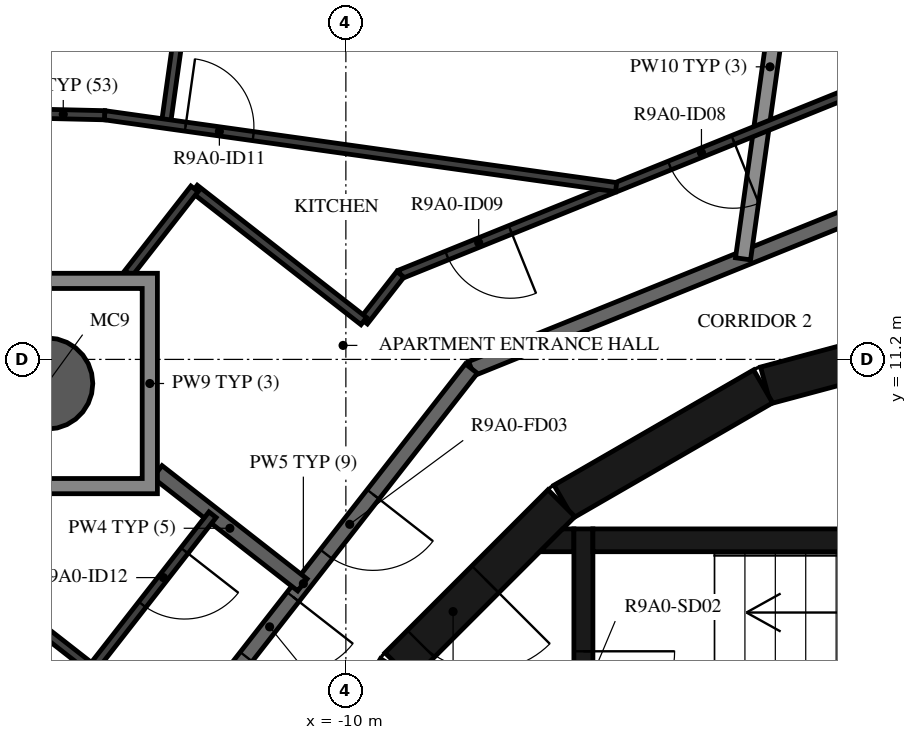
"""IFC4 building model, lengths in metres.
Left out: names, types, materials, properties, quantities, classifications, styles, units other than length and angle.
Written with IfcOpenShell. Run it as: python <this file> out.ifc"""

import sys

from ifc_helpers import new_model, si_unit, direction, frame, frame_2d, origin, origin_2d, place, context, subcontext, project, spatial, polyline, rectangle, hollow_circle, outline, extrude, element, fill, save


model = new_model("IFC4")
c1 = context("Model", 3, precision=1e-05, world=origin(), true_north=direction((0.0, 1.0)))
c2 = subcontext(c1, "Body", "Model", "MODEL_VIEW")
j1 = project(units=[si_unit("LENGTHUNIT", "METRE"), si_unit("PLANEANGLEUNIT", "RADIAN")], contexts=[c1])
p1 = place(None, origin())
s1 = spatial("IfcSite", under=j1, at=p1, CompositionType="ELEMENT")
p2 = place(p1, origin())
s2 = spatial("IfcBuilding", under=s1, at=p2, CompositionType="ELEMENT")
p3 = place(p2, frame((0.0, 0.0, 340.0)))
s3 = spatial("IfcBuildingStorey", under=s2, at=p3, CompositionType="ELEMENT", Elevation=340.0)
p4 = place(p3, frame((-13.929, 10.883, -0.38), z_axis=(0.0, 0.0, 1.0), x_axis=(1.0, 0.0, 0.0)))
e1 = element("IfcColumn", 1, at=p4, inside=s3, PredefinedType="COLUMN", context=c2, shape_type="SweptSolid", body=[
    extrude(hollow_circle(Radius=0.6, WallThickness=0.03, at=origin_2d()), origin(), (0.0, 0.0, 1.0), 3.5),
])
for number, where, z_axis, x_axis in (
    (2, (-1.55, 11.643, 0.0), (0.0, 0.0, 1.0), (-0.966, -0.259, 0.0)),
    (3, (-4.51, 10.845, 0.0), (0.0, 0.0, 1.0), (-0.866, -0.5, 0.0)),
):
    element("IfcWall", number, at=place(p3, frame(where, z_axis=z_axis, x_axis=x_axis)), inside=s3, PredefinedType="SHEAR", context=c2, shape_type="SweptSolid", body=[
        extrude(rectangle(XDim=3.033, YDim=0.5, at=frame_2d((1.516, 0.0))), origin(), (0.0, 0.0, 1.0), 3.12),
    ])
p5 = place(p3, frame((-7.164, 9.308, 0.0), z_axis=(0.0, 0.0, 1.0), x_axis=(-0.707106781187, -0.707106781187, 0.0)))
e4 = element("IfcWall", 4, at=p5, inside=s3, PredefinedType="SHEAR", context=c2, shape_type="SweptSolid", body=[
    extrude(rectangle(XDim=3.032, YDim=0.5, at=frame_2d((1.516, 0.0))), origin(), (0.0, 0.0, 1.0), 3.12),
])
p6 = place(p5, frame((1.416, 0.0, 0.0)))
e5 = element("IfcOpeningElement", 5, at=p6, cuts=e4, PredefinedType="OPENING", context=c2, shape_type="SweptSolid", body=[
    extrude(rectangle(XDim=1.2, YDim=2.1, at=frame_2d((0.6, 1.05))), frame((0.0, 0.26, 0.0), z_axis=(0.0, -1.0, 0.0), x_axis=(1.0, 0.0, 0.0)), (0.0, 0.0, 1.0), 0.52),
])
p7 = place(p3, frame((-9.329, 7.137, 0.0), z_axis=(0.0, 0.0, 1.0), x_axis=(-0.500087131594, -0.865975092491, 0.0)))
e6 = element("IfcWall", 6, at=p7, inside=s3, PredefinedType="SHEAR", context=c2, shape_type="SweptSolid", body=[
    extrude(rectangle(XDim=3.033, YDim=0.5, at=frame_2d((1.516, 0.0))), origin(), (0.0, 0.0, 1.0), 3.12),
])
p8 = place(p3, frame((-6.75, 8.82, 0.0), z_axis=(0.0, 0.0, 1.0), x_axis=(1.0, 0.0, 0.0)))
e7 = element("IfcWall", 7, at=p8, inside=s3, PredefinedType="SHEAR", context=c2, shape_type="SweptSolid", body=[
    extrude(rectangle(XDim=6.75, YDim=0.3, at=frame_2d((3.375, 0.0))), origin(), (0.0, 0.0, 1.0), 3.12),
])
p9 = place(p3, frame((-6.875, 8.97, 0.0), z_axis=(0.0, 0.0, 1.0), x_axis=(0.0, -1.0, 0.0)))
e8 = element("IfcWall", 8, at=p9, inside=s3, PredefinedType="SHEAR", context=c2, shape_type="SweptSolid", body=[
    extrude(rectangle(XDim=3.92, YDim=0.25, at=frame_2d((1.96, 0.0))), origin(), (0.0, 0.0, 1.0), 3.12),
])
p10 = place(p9, frame((1.61, 0.0, 0.0)))
e9 = element("IfcOpeningElement", 9, at=p10, cuts=e8, PredefinedType="OPENING", context=c2, shape_type="SweptSolid", body=[
    extrude(rectangle(XDim=1.2, YDim=2.1, at=frame_2d((0.6, 1.05))), frame((0.0, 0.135, 0.0), z_axis=(0.0, -1.0, 0.0), x_axis=(1.0, 0.0, 0.0)), (0.0, 0.0, 1.0), 0.27),
])
p11 = place(p3, origin())
e10 = element("IfcWall", 10, at=p11, inside=s3, PredefinedType="SHEAR", context=c2, shape_type="SweptSolid", body=[
    extrude(outline(polyline([(-7.148, 8.97), (-7.0, 8.97), (-7.0, 8.67), (-7.448, 8.67), (-7.148, 8.97)])), origin(), (0.0, 0.0, 1.0), 3.12),
])
p12 = place(p3, frame((-1.691, 13.769, 0.0), z_axis=(0.0, 0.0, 1.0), x_axis=(-0.92717916932, -0.374618189599, 0.0)))
e11 = element("IfcWall", 11, at=p12, inside=s3, PredefinedType="STANDARD", context=c2, shape_type="SweptSolid", body=[
    extrude(rectangle(XDim=7.181, YDim=0.2, at=frame_2d((3.591, 0.0))), origin(), (0.0, 0.0, 1.0), 3.12),
])
p13 = place(p3, frame((-8.349, 11.079, 0.0), z_axis=(0.0, 0.0, 1.0), x_axis=(-0.615669112324, -0.78800478687, 0.0)))
e12 = element("IfcWall", 12, at=p13, inside=s3, PredefinedType="STANDARD", context=c2, shape_type="SweptSolid", body=[
    extrude(rectangle(XDim=7.181, YDim=0.2, at=frame_2d((3.591, 0.0))), origin(), (0.0, 0.0, 1.0), 3.12),
])
p14 = place(p13, frame((2.1, 0.0, 0.0)))
e13 = element("IfcOpeningElement", 13, at=p14, cuts=e12, PredefinedType="OPENING", context=c2, shape_type="SweptSolid", body=[
    extrude(rectangle(XDim=1.0, YDim=2.1, at=frame_2d((0.5, 1.05))), frame((0.0, 0.11, 0.0), z_axis=(0.0, -1.0, 0.0), x_axis=(1.0, 0.0, 0.0)), (0.0, 0.0, 1.0), 0.22),
])
p15 = place(p13, frame((3.811, 0.0, 0.0)))
e14 = element("IfcOpeningElement", 14, at=p15, cuts=e12, PredefinedType="OPENING", context=c2, shape_type="SweptSolid", body=[
    extrude(rectangle(XDim=1.0, YDim=2.1, at=frame_2d((0.5, 1.05))), frame((0.0, 0.11, 0.0), z_axis=(0.0, -1.0, 0.0), x_axis=(1.0, 0.0, 0.0)), (0.0, 0.0, 1.0), 0.22),
])
p16 = place(p3, frame((-4.065, 17.575, 0.0), z_axis=(0.0, 0.0, 1.0), x_axis=(-0.139163175955, -0.990269463559, 0.0)))
e15 = element("IfcWall", 15, at=p16, inside=s3, PredefinedType="STANDARD", context=c2, shape_type="SweptSolid", body=[
    extrude(rectangle(XDim=5.102, YDim=0.2, at=frame_2d((2.551, 0.0))), origin(), (0.0, 0.0, 1.0), 2.73),
])
p17 = place(p3, frame((-12.479, 9.723, 0.0), z_axis=(0.0, 0.0, 1.0), x_axis=(0.788030490991, -0.615636211792, 0.0)))
e16 = element("IfcWall", 16, at=p17, inside=s3, PredefinedType="STANDARD", context=c2, shape_type="SweptSolid", body=[
    extrude(rectangle(XDim=2.42, YDim=0.2, at=frame_2d((1.21, 0.0))), origin(), (0.0, 0.0, 1.0), 3.12),
])
p18 = place(p3, frame((-1.88, 15.311, 0.0), z_axis=(0.0, 0.0, 1.0), x_axis=(-0.927184866592, -0.374604088557, 0.0)))
e17 = element("IfcWall", 17, at=p18, inside=s3, PredefinedType="PARTITIONING", context=c2, shape_type="SweptSolid", body=[
    extrude(rectangle(XDim=7.985, YDim=0.12, at=frame_2d((3.993, 0.0))), origin(), (0.0, 0.0, 1.0), 3.12),
])
p19 = place(p18, frame((3.262, 0.0, 0.0)))
e18 = element("IfcOpeningElement", 18, at=p19, cuts=e17, PredefinedType="OPENING", context=c2, shape_type="SweptSolid", body=[
    extrude(rectangle(XDim=0.9, YDim=2.1, at=frame_2d((0.45, 1.05))), frame((0.0, 0.07, 0.0), z_axis=(0.0, -1.0, 0.0), x_axis=(1.0, 0.0, 0.0)), (0.0, 0.0, 1.0), 0.14),
])
p20 = place(p18, frame((6.423, 0.0, 0.0)))
e19 = element("IfcOpeningElement", 19, at=p20, cuts=e17, PredefinedType="OPENING", context=c2, shape_type="SweptSolid", body=[
    extrude(rectangle(XDim=0.9, YDim=2.1, at=frame_2d((0.45, 1.05))), frame((0.0, 0.07, 0.0), z_axis=(0.0, -1.0, 0.0), x_axis=(1.0, 0.0, 0.0)), (0.0, 0.0, 1.0), 0.14),
])
p21 = place(p3, frame((-9.283, 12.319, 0.0), z_axis=(0.0, 0.0, 1.0), x_axis=(-0.615735018346, -0.787953289975, 0.0)))
e20 = element("IfcWall", 20, at=p21, inside=s3, PredefinedType="PARTITIONING", context=c2, shape_type="SweptSolid", body=[
    extrude(rectangle(XDim=0.781, YDim=0.12, at=frame_2d((0.391, 0.0))), origin(), (0.0, 0.0, 1.0), 3.12),
])
p22 = place(p3, frame((-9.764, 11.704, 0.0), z_axis=(0.0, 0.0, 1.0), x_axis=(-0.787996873396, 0.615679240772, 0.0)))
e21 = element("IfcWall", 21, at=p22, inside=s3, PredefinedType="PARTITIONING", context=c2, shape_type="SweptSolid", body=[
    extrude(rectangle(XDim=2.826, YDim=0.12, at=frame_2d((1.413, 0.0))), origin(), (0.0, 0.0, 1.0), 3.12),
])
p23 = place(p3, frame((-11.992, 13.444, 0.0), z_axis=(0.0, 0.0, 1.0), x_axis=(-0.615593635541, -0.788063751153, 0.0)))
e22 = element("IfcWall", 22, at=p23, inside=s3, PredefinedType="PARTITIONING", context=c2, shape_type="SweptSolid", body=[
    extrude(rectangle(XDim=1.41, YDim=0.12, at=frame_2d((0.705, 0.0))), origin(), (0.0, 0.0, 1.0), 3.12),
])
p24 = place(p3, frame((-11.755, 18.656, 0.0), z_axis=(0.0, 0.0, 1.0), x_axis=(-0.13916046232, -0.990269844904, 0.0)))
e23 = element("IfcWall", 23, at=p24, inside=s3, PredefinedType="PARTITIONING", context=c2, shape_type="SweptSolid", body=[
    extrude(rectangle(XDim=4.4, YDim=0.12, at=frame_2d((2.2, 0.0))), origin(), (0.0, 0.0, 1.0), 2.73),
])
p25 = place(p24, frame((0.2, 0.0, 0.0)))
e24 = element("IfcOpeningElement", 24, at=p25, cuts=e23, PredefinedType="OPENING", context=c2, shape_type="SweptSolid", body=[
    extrude(rectangle(XDim=0.9, YDim=2.1, at=frame_2d((0.45, 1.05))), frame((0.0, 0.07, 0.0), z_axis=(0.0, -1.0, 0.0), x_axis=(1.0, 0.0, 0.0)), (0.0, 0.0, 1.0), 0.14),
])
p26 = place(p3, frame((-13.175, 14.412, 0.0), z_axis=(0.0, 0.0, 1.0), x_axis=(0.990264549393, -0.139198140128, 0.0)))
e25 = element("IfcWall", 25, at=p26, inside=s3, PredefinedType="PARTITIONING", context=c2, shape_type="SweptSolid", body=[
    extrude(rectangle(XDim=6.796, YDim=0.12, at=frame_2d((3.398, 0.0))), origin(), (0.0, 0.0, 1.0), 3.12),
])
p27 = place(p26, frame((1.075, 0.0, 0.0)))
e26 = element("IfcOpeningElement", 26, at=p27, cuts=e25, PredefinedType="OPENING", context=c2, shape_type="SweptSolid", body=[
    extrude(rectangle(XDim=0.9, YDim=2.1, at=frame_2d((0.45, 1.05))), frame((0.0, 0.07, 0.0), z_axis=(0.0, -1.0, 0.0), x_axis=(1.0, 0.0, 0.0)), (0.0, 0.0, 1.0), 0.14),
])
p28 = place(p3, frame((-14.261, 14.438, 0.0), z_axis=(0.0, 0.0, 1.0), x_axis=(0.999732237365, -0.023139869764, 0.0)))
e27 = element("IfcWall", 27, at=p28, inside=s3, PredefinedType="PARTITIONING", context=c2, shape_type="SweptSolid", body=[
    extrude(rectangle(XDim=1.087, YDim=0.12, at=frame_2d((0.543, 0.0))), origin(), (0.0, 0.0, 1.0), 3.12),
])
p29 = place(p3, frame((-11.754, 9.157, 0.0), z_axis=(0.0, 0.0, 1.0), x_axis=(-0.615568539365, -0.788083354312, 0.0)))
e28 = element("IfcWall", 28, at=p29, inside=s3, PredefinedType="PARTITIONING", context=c2, shape_type="SweptSolid", body=[
    extrude(rectangle(XDim=2.573, YDim=0.12, at=frame_2d((1.286, 0.0))), origin(), (0.0, 0.0, 1.0), 3.12),
])
p30 = place(p29, frame((0.6, 0.0, 0.0)))
e29 = element("IfcOpeningElement", 29, at=p30, cuts=e28, PredefinedType="OPENING", context=c2, shape_type="SweptSolid", body=[
    extrude(rectangle(XDim=0.9, YDim=2.1, at=frame_2d((0.45, 1.05))), frame((0.0, 0.07, 0.0), z_axis=(0.0, -1.0, 0.0), x_axis=(1.0, 0.0, 0.0)), (0.0, 0.0, 1.0), 0.14),
])
p31 = place(p3, frame((-13.338, 7.129, 0.0), z_axis=(0.0, 0.0, 1.0), x_axis=(-0.787938483233, 0.615753965997, 0.0)))
e30 = element("IfcWall", 30, at=p31, inside=s3, PredefinedType="PARTITIONING", context=c2, shape_type="SweptSolid", body=[
    extrude(rectangle(XDim=1.853, YDim=0.12, at=frame_2d((0.927, 0.0))), origin(), (0.0, 0.0, 1.0), 3.12),
])
p32 = place(p3, origin())
e31 = element("IfcWall", 31, at=p32, inside=s3, PredefinedType="STANDARD", context=c2, shape_type="SweptSolid", body=[
    extrude(outline(polyline([(-12.479, 12.333), (-12.479, 9.433), (-15.379, 9.433), (-15.379, 12.333), (-12.479, 12.333)]), holes=[polyline([(-15.179, 9.633), (-12.679, 9.633), (-12.679, 12.133), (-15.179, 12.133), (-15.179, 9.633)])]), origin(), (0.0, 0.0, 1.0), 3.12),
])
p33 = place(p10, origin())
e32 = element("IfcDoor", 32, at=p33, inside=s3, OperationType="SINGLE_SWING_LEFT", PredefinedType="DOOR", context=c2, shape_type="SweptSolid", body=[
    extrude(rectangle(XDim=1.2, YDim=2.1, at=frame_2d((0.6, 1.05))), frame((0.0, 0.025, 0.0), z_axis=(0.0, -1.0, 0.0), x_axis=(1.0, 0.0, 0.0)), (0.0, 0.0, 1.0), 0.05),
])
fill(e9, e32)
p34 = place(p6, origin())
e33 = element("IfcDoor", 33, at=p34, inside=s3, OperationType="SINGLE_SWING_RIGHT", PredefinedType="DOOR", context=c2, shape_type="SweptSolid", body=[
    extrude(rectangle(XDim=1.2, YDim=2.1, at=frame_2d((0.6, 1.05))), frame((0.0, 0.025, 0.0), z_axis=(0.0, -1.0, 0.0), x_axis=(1.0, 0.0, 0.0)), (0.0, 0.0, 1.0), 0.05),
])
fill(e5, e33)
p35 = place(p14, origin())
e34 = element("IfcDoor", 34, at=p35, inside=s3, OperationType="SINGLE_SWING_RIGHT", PredefinedType="DOOR", context=c2, shape_type="SweptSolid", body=[
    extrude(rectangle(XDim=1.0, YDim=2.1, at=frame_2d((0.5, 1.05))), frame((0.0, 0.025, 0.0), z_axis=(0.0, -1.0, 0.0), x_axis=(1.0, 0.0, 0.0)), (0.0, 0.0, 1.0), 0.05),
])
fill(e13, e34)
p36 = place(p19, origin())
e35 = element("IfcDoor", 35, at=p36, inside=s3, OperationType="SINGLE_SWING_RIGHT", PredefinedType="DOOR", context=c2, shape_type="SweptSolid", body=[
    extrude(rectangle(XDim=0.9, YDim=2.1, at=frame_2d((0.45, 1.05))), frame((0.0, 0.025, 0.0), z_axis=(0.0, -1.0, 0.0), x_axis=(1.0, 0.0, 0.0)), (0.0, 0.0, 1.0), 0.05),
])
fill(e18, e35)
p37 = place(p20, origin())
e36 = element("IfcDoor", 36, at=p37, inside=s3, OperationType="SINGLE_SWING_RIGHT", PredefinedType="DOOR", context=c2, shape_type="SweptSolid", body=[
    extrude(rectangle(XDim=0.9, YDim=2.1, at=frame_2d((0.45, 1.05))), frame((0.0, 0.025, 0.0), z_axis=(0.0, -1.0, 0.0), x_axis=(1.0, 0.0, 0.0)), (0.0, 0.0, 1.0), 0.05),
])
fill(e19, e36)
p38 = place(p27, origin())
e37 = element("IfcDoor", 37, at=p38, inside=s3, OperationType="SINGLE_SWING_LEFT", PredefinedType="DOOR", context=c2, shape_type="SweptSolid", body=[
    extrude(rectangle(XDim=0.9, YDim=2.1, at=frame_2d((0.45, 1.05))), frame((0.0, 0.025, 0.0), z_axis=(0.0, -1.0, 0.0), x_axis=(1.0, 0.0, 0.0)), (0.0, 0.0, 1.0), 0.05),
])
fill(e26, e37)
p39 = place(p15, origin())
e38 = element("IfcDoor", 38, at=p39, inside=s3, OperationType="SINGLE_SWING_LEFT", PredefinedType="DOOR", context=c2, shape_type="SweptSolid", body=[
    extrude(rectangle(XDim=1.0, YDim=2.1, at=frame_2d((0.5, 1.05))), frame((0.0, 0.025, 0.0), z_axis=(0.0, -1.0, 0.0), x_axis=(1.0, 0.0, 0.0)), (0.0, 0.0, 1.0), 0.05),
])
fill(e14, e38)
p40 = place(p30, origin())
e39 = element("IfcDoor", 39, at=p40, inside=s3, OperationType="SINGLE_SWING_LEFT", PredefinedType="DOOR", context=c2, shape_type="SweptSolid", body=[
    extrude(rectangle(XDim=0.9, YDim=2.1, at=frame_2d((0.45, 1.05))), frame((0.0, 0.025, 0.0), z_axis=(0.0, -1.0, 0.0), x_axis=(1.0, 0.0, 0.0)), (0.0, 0.0, 1.0), 0.05),
])
fill(e29, e39)
save(model, sys.argv[1])
